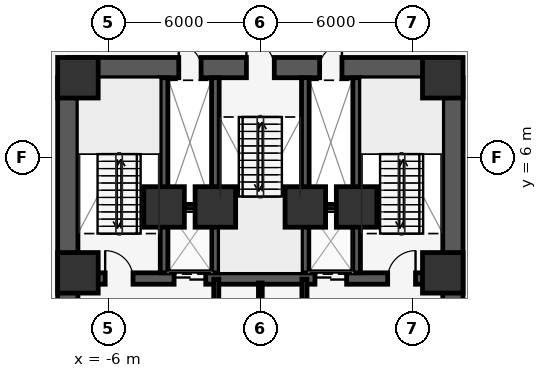
"""IFC4 building model, lengths in metres.
Left out: names, types, materials, properties, quantities, classifications, styles, units other than length and angle.
Written with IfcOpenShell. Run it as: python <this file> out.ifc"""

import sys

from ifc_helpers import new_model, si_unit, direction, frame, frame_2d, origin, origin_2d, place, context, subcontext, project, spatial, rectangle, extrude, element, fill, save


model = new_model("IFC4")
c1 = context("Model", 3, precision=1e-05, world=origin(), true_north=direction((0.0, 1.0)))
c2 = subcontext(c1, "Body", "Model", "MODEL_VIEW")
j1 = project(units=[si_unit("LENGTHUNIT", "METRE"), si_unit("PLANEANGLEUNIT", "RADIAN")], contexts=[c1])
p1 = place(None, origin())
s1 = spatial("IfcSite", under=j1, at=p1, CompositionType="ELEMENT")
p2 = place(p1, origin())
s2 = spatial("IfcBuilding", under=s1, at=p2, CompositionType="ELEMENT")
p3 = place(p2, frame((0.0, 0.0, 34.4)))
s3 = spatial("IfcBuildingStorey", under=s2, at=p3, CompositionType="ELEMENT", Elevation=34.4)
p4 = place(p3, frame((-7.6, 9.55, 0.0), z_axis=(0.0, 0.0, 1.0), x_axis=(1.0, 0.0, 0.0)))
e1 = element("IfcWall", 1, at=p4, inside=s3, PredefinedType="SHEAR", context=c2, shape_type="SweptSolid", body=[
    extrude(rectangle(XDim=15.2, YDim=0.8, at=frame_2d((7.6, 0.0))), origin(), (0.0, 0.0, 1.0), 3.75),
])
p5 = place(p4, frame((7.05, 0.0, 0.0)))
e2 = element("IfcOpeningElement", 2, at=p5, cuts=e1, PredefinedType="OPENING", context=c2, shape_type="SweptSolid", body=[
    extrude(rectangle(XDim=1.1, YDim=2.15, at=frame_2d((0.55, 1.075))), frame((0.0, 0.41, 0.0), z_axis=(0.0, -1.0, 0.0), x_axis=(1.0, 0.0, 0.0)), (0.0, 0.0, 1.0), 0.82),
])
p6 = place(p4, frame((4.38, 0.0, 0.0)))
e3 = element("IfcOpeningElement", 3, at=p6, cuts=e1, PredefinedType="OPENING", context=c2, shape_type="SweptSolid", body=[
    extrude(rectangle(XDim=0.88, YDim=2.15, at=frame_2d((0.44, 1.075))), frame((0.0, 0.41, 0.0), z_axis=(0.0, -1.0, 0.0), x_axis=(1.0, 0.0, 0.0)), (0.0, 0.0, 1.0), 0.82),
])
p7 = place(p4, frame((9.94, 0.0, 0.0)))
e4 = element("IfcOpeningElement", 4, at=p7, cuts=e1, PredefinedType="OPENING", context=c2, shape_type="SweptSolid", body=[
    extrude(rectangle(XDim=0.88, YDim=2.15, at=frame_2d((0.44, 1.075))), frame((0.0, 0.41, 0.0), z_axis=(0.0, -1.0, 0.0), x_axis=(1.0, 0.0, 0.0)), (0.0, 0.0, 1.0), 0.82),
])
p8 = place(p3, frame((-7.2, 1.225, 0.0), z_axis=(0.0, 0.0, 1.0), x_axis=(1.0, 0.0, 0.0)))
e5 = element("IfcWall", 5, at=p8, inside=s3, PredefinedType="SHEAR", context=c2, shape_type="SweptSolid", body=[
    extrude(rectangle(XDim=14.4, YDim=0.45, at=frame_2d((7.2, 0.0))), origin(), (0.0, 0.0, 1.0), 3.75),
])
p9 = place(p8, frame((3.795, 0.0, 0.0)))
e6 = element("IfcOpeningElement", 6, at=p9, cuts=e5, PredefinedType="OPENING", context=c2, shape_type="SweptSolid", body=[
    extrude(rectangle(XDim=1.25, YDim=2.25, at=frame_2d((0.625, 1.125))), frame((0.0, 0.235, 0.0), z_axis=(0.0, -1.0, 0.0), x_axis=(1.0, 0.0, 0.0)), (0.0, 0.0, 1.0), 0.47),
])
p10 = place(p8, frame((9.355, 0.0, 0.0)))
e7 = element("IfcOpeningElement", 7, at=p10, cuts=e5, PredefinedType="OPENING", context=c2, shape_type="SweptSolid", body=[
    extrude(rectangle(XDim=1.25, YDim=2.25, at=frame_2d((0.625, 1.125))), frame((0.0, 0.235, 0.0), z_axis=(0.0, -1.0, 0.0), x_axis=(1.0, 0.0, 0.0)), (0.0, 0.0, 1.0), 0.47),
])
p11 = place(p8, frame((1.075, 0.0, 0.0)))
e8 = element("IfcOpeningElement", 8, at=p11, cuts=e5, PredefinedType="OPENING", context=c2, shape_type="SweptSolid", body=[
    extrude(rectangle(XDim=1.1, YDim=2.15, at=frame_2d((0.55, 1.075))), frame((0.0, 0.235, 0.0), z_axis=(0.0, -1.0, 0.0), x_axis=(1.0, 0.0, 0.0)), (0.0, 0.0, 1.0), 0.47),
])
p12 = place(p8, frame((12.225, 0.0, 0.0)))
e9 = element("IfcOpeningElement", 9, at=p12, cuts=e5, PredefinedType="OPENING", context=c2, shape_type="SweptSolid", body=[
    extrude(rectangle(XDim=1.1, YDim=2.15, at=frame_2d((0.55, 1.075))), frame((0.0, 0.235, 0.0), z_axis=(0.0, -1.0, 0.0), x_axis=(1.0, 0.0, 0.0)), (0.0, 0.0, 1.0), 0.47),
])
for number, where, z_axis, x_axis in (
    (10, (-3.8, 1.45, 0.0), (0.0, 0.0, 1.0), (0.0, 1.0, 0.0)),
    (11, (-1.775, 1.45, 0.0), (0.0, 0.0, 1.0), (0.0, 1.0, 0.0)),
    (12, (1.775, 1.45, 0.0), (0.0, 0.0, 1.0), (0.0, 1.0, 0.0)),
    (13, (3.8, 1.45, 0.0), (0.0, 0.0, 1.0), (0.0, 1.0, 0.0)),
):
    element("IfcWall", number, at=place(p3, frame(where, z_axis=z_axis, x_axis=x_axis)), inside=s3, PredefinedType="SHEAR", context=c2, shape_type="SweptSolid", body=[
        extrude(rectangle(XDim=7.7, YDim=0.3, at=frame_2d((3.85, 0.0))), origin(), (0.0, 0.0, 1.0), 3.75),
    ])
for number, where, z_axis, x_axis in (
    (14, (-7.6, 0.1, 0.0), (0.0, 0.0, 1.0), (0.0, 1.0, 0.0)),
    (15, (7.6, 0.1, 0.0), (0.0, 0.0, 1.0), (0.0, 1.0, 0.0)),
):
    element("IfcWall", number, at=place(p3, frame(where, z_axis=z_axis, x_axis=x_axis)), inside=s3, PredefinedType="SHEAR", context=c2, shape_type="SweptSolid", body=[
        extrude(rectangle(XDim=9.05, YDim=0.8, at=frame_2d((4.525, 0.0))), origin(), (0.0, 0.0, 1.0), 3.75),
    ])
for number, where, z_axis, x_axis in (
    (16, (7.2, 1.45, 0.0), (0.0, 0.0, 1.0), (1.0, 0.0, 0.0)),
    (17, (7.2, 9.15, 0.0), (0.0, 0.0, 1.0), (1.0, 0.0, 0.0)),
    (18, (-7.2, 9.15, 0.0), (0.0, 0.0, 1.0), (1.0, 0.0, 0.0)),
    (19, (-7.2, 1.45, 0.0), (0.0, 0.0, 1.0), (1.0, 0.0, 0.0)),
    (20, (-3.8, 4.05, 0.0), (0.0, 0.0, 1.0), (1.0, 0.0, 0.0)),
    (21, (3.8, 4.05, 0.0), (0.0, 0.0, 1.0), (1.0, 0.0, 0.0)),
    (22, (-1.775, 4.05, 0.0), (0.0, 0.0, 1.0), (1.0, 0.0, 0.0)),
    (23, (1.775, 4.05, 0.0), (0.0, 0.0, 1.0), (1.0, 0.0, 0.0)),
):
    element("IfcColumn", number, at=place(p3, frame(where, z_axis=z_axis, x_axis=x_axis)), inside=s3, PredefinedType="COLUMN", context=c2, shape_type="SweptSolid", body=[
        extrude(rectangle(XDim=1.6, YDim=1.6, at=origin_2d()), origin(), (0.0, 0.0, 1.0), 4.0),
    ])
p13 = place(p3, frame((4.923, 41.122, 0.0), z_axis=(0.0, 0.0, 1.0), x_axis=(0.504213113214, -0.863579258935, 0.0)))
e24 = element("IfcWall", 24, at=p13, inside=s3, PredefinedType="STANDARD", context=c2, shape_type="SweptSolid", body=[
    extrude(rectangle(XDim=67.041, YDim=0.32, at=frame_2d((33.521, 0.0))), origin(), (0.0, 0.0, 1.0), 3.75),
])
p14 = place(p13, frame((33.021, 0.0, 0.0)))
e25 = element("IfcOpeningElement", 25, at=p14, cuts=e24, PredefinedType="OPENING", context=c2, shape_type="SweptSolid", body=[
    extrude(rectangle(XDim=1.0, YDim=2.15, at=frame_2d((0.5, 1.075))), frame((0.0, 0.17, 0.0), z_axis=(0.0, -1.0, 0.0), x_axis=(1.0, 0.0, 0.0)), (0.0, 0.0, 1.0), 0.34),
])
p15 = place(p3, frame((-38.726, -16.773, 0.0), z_axis=(0.0, 0.0, 1.0), x_axis=(0.504213113214, 0.863579258935, 0.0)))
e26 = element("IfcWall", 26, at=p15, inside=s3, PredefinedType="STANDARD", context=c2, shape_type="SweptSolid", body=[
    extrude(rectangle(XDim=67.041, YDim=0.32, at=frame_2d((33.521, 0.0))), origin(), (0.0, 0.0, 1.0), 3.75),
])
p16 = place(p15, frame((33.021, 0.0, 0.0)))
e27 = element("IfcOpeningElement", 27, at=p16, cuts=e26, PredefinedType="OPENING", context=c2, shape_type="SweptSolid", body=[
    extrude(rectangle(XDim=1.0, YDim=2.15, at=frame_2d((0.5, 1.075))), frame((0.0, 0.17, 0.0), z_axis=(0.0, -1.0, 0.0), x_axis=(1.0, 0.0, 0.0)), (0.0, 0.0, 1.0), 0.34),
])
for number, where, z_axis, x_axis in (
    (28, (-3.65, 4.05, 0.0), (0.0, 0.0, 1.0), (1.0, 0.0, 0.0)),
    (29, (1.92, 4.05, 0.0), (0.0, 0.0, 1.0), (1.0, 0.0, 0.0)),
):
    element("IfcWall", number, at=place(p3, frame(where, z_axis=z_axis, x_axis=x_axis)), inside=s3, PredefinedType="PARTITIONING", context=c2, shape_type="SweptSolid", body=[
        extrude(rectangle(XDim=1.73, YDim=0.2, at=frame_2d((0.865, 0.0))), origin(), (0.0, 0.0, 1.0), 3.75),
    ])
p17 = place(p3, frame((-1.74, -1.78, 0.0), z_axis=(0.0, 0.0, 1.0), x_axis=(0.0, 1.0, 0.0)))
e30 = element("IfcWall", 30, at=p17, inside=s3, PredefinedType="PARTITIONING", context=c2, shape_type="SweptSolid", body=[
    extrude(rectangle(XDim=2.98, YDim=0.2, at=frame_2d((1.49, 0.0))), origin(), (0.0, 0.0, 1.0), 3.75),
])
p18 = place(p17, frame((0.89, 0.0, 0.0)))
e31 = element("IfcOpeningElement", 31, at=p18, cuts=e30, PredefinedType="OPENING", context=c2, shape_type="SweptSolid", body=[
    extrude(rectangle(XDim=0.88, YDim=2.15, at=frame_2d((0.44, 1.075))), frame((0.0, 0.11, 0.0), z_axis=(0.0, -1.0, 0.0), x_axis=(1.0, 0.0, 0.0)), (0.0, 0.0, 1.0), 0.22),
])
p19 = place(p3, frame((1.74, -1.78, 0.0), z_axis=(0.0, 0.0, 1.0), x_axis=(0.0, 1.0, 0.0)))
e32 = element("IfcWall", 32, at=p19, inside=s3, PredefinedType="PARTITIONING", context=c2, shape_type="SweptSolid", body=[
    extrude(rectangle(XDim=2.98, YDim=0.2, at=frame_2d((1.49, 0.0))), origin(), (0.0, 0.0, 1.0), 3.75),
])
p20 = place(p19, frame((0.89, 0.0, 0.0)))
e33 = element("IfcOpeningElement", 33, at=p20, cuts=e32, PredefinedType="OPENING", context=c2, shape_type="SweptSolid", body=[
    extrude(rectangle(XDim=0.88, YDim=2.15, at=frame_2d((0.44, 1.075))), frame((0.0, 0.11, 0.0), z_axis=(0.0, -1.0, 0.0), x_axis=(1.0, 0.0, 0.0)), (0.0, 0.0, 1.0), 0.22),
])
p21 = place(p3, frame((0.0, -1.78, 0.0), z_axis=(0.0, 0.0, 1.0), x_axis=(0.0, 1.0, 0.0)))
e34 = element("IfcWall", 34, at=p21, inside=s3, PredefinedType="PARTITIONING", context=c2, shape_type="SweptSolid", body=[
    extrude(rectangle(XDim=2.83, YDim=0.15, at=frame_2d((1.415, 0.0))), origin(), (0.0, 0.0, 1.0), 3.75),
])
p22 = place(p9, origin())
e35 = element("IfcDoor", 35, at=p22, inside=s3, OperationType="DOUBLE_DOOR_SLIDING", PredefinedType="DOOR", context=c2, shape_type="SweptSolid", body=[
    extrude(rectangle(XDim=1.25, YDim=2.25, at=frame_2d((0.625, 1.125))), frame((0.0, 0.025, 0.0), z_axis=(0.0, -1.0, 0.0), x_axis=(1.0, 0.0, 0.0)), (0.0, 0.0, 1.0), 0.05),
])
fill(e6, e35)
p23 = place(p10, origin())
e36 = element("IfcDoor", 36, at=p23, inside=s3, OperationType="DOUBLE_DOOR_SLIDING", PredefinedType="DOOR", context=c2, shape_type="SweptSolid", body=[
    extrude(rectangle(XDim=1.25, YDim=2.25, at=frame_2d((0.625, 1.125))), frame((0.0, 0.025, 0.0), z_axis=(0.0, -1.0, 0.0), x_axis=(1.0, 0.0, 0.0)), (0.0, 0.0, 1.0), 0.05),
])
fill(e7, e36)
p24 = place(p11, origin())
e37 = element("IfcDoor", 37, at=p24, inside=s3, OperationType="SINGLE_SWING_LEFT", PredefinedType="DOOR", context=c2, shape_type="SweptSolid", body=[
    extrude(rectangle(XDim=1.1, YDim=2.15, at=frame_2d((0.55, 1.075))), frame((0.0, 0.025, 0.0), z_axis=(0.0, -1.0, 0.0), x_axis=(1.0, 0.0, 0.0)), (0.0, 0.0, 1.0), 0.05),
])
fill(e8, e37)
p25 = place(p12, origin())
e38 = element("IfcDoor", 38, at=p25, inside=s3, OperationType="SINGLE_SWING_RIGHT", PredefinedType="DOOR", context=c2, shape_type="SweptSolid", body=[
    extrude(rectangle(XDim=1.1, YDim=2.15, at=frame_2d((0.55, 1.075))), frame((0.0, 0.025, 0.0), z_axis=(0.0, -1.0, 0.0), x_axis=(1.0, 0.0, 0.0)), (0.0, 0.0, 1.0), 0.05),
])
fill(e9, e38)
p26 = place(p5, origin())
e39 = element("IfcDoor", 39, at=p26, inside=s3, OperationType="SINGLE_SWING_LEFT", PredefinedType="DOOR", context=c2, shape_type="SweptSolid", body=[
    extrude(rectangle(XDim=1.1, YDim=2.15, at=frame_2d((0.55, 1.075))), frame((0.0, 0.025, 0.0), z_axis=(0.0, -1.0, 0.0), x_axis=(1.0, 0.0, 0.0)), (0.0, 0.0, 1.0), 0.05),
])
fill(e2, e39)
p27 = place(p6, origin())
e40 = element("IfcDoor", 40, at=p27, inside=s3, OperationType="SINGLE_SWING_LEFT", PredefinedType="DOOR", context=c2, shape_type="SweptSolid", body=[
    extrude(rectangle(XDim=0.88, YDim=2.15, at=frame_2d((0.44, 1.075))), frame((0.0, 0.025, 0.0), z_axis=(0.0, -1.0, 0.0), x_axis=(1.0, 0.0, 0.0)), (0.0, 0.0, 1.0), 0.05),
])
fill(e3, e40)
p28 = place(p7, origin())
e41 = element("IfcDoor", 41, at=p28, inside=s3, OperationType="SINGLE_SWING_RIGHT", PredefinedType="DOOR", context=c2, shape_type="SweptSolid", body=[
    extrude(rectangle(XDim=0.88, YDim=2.15, at=frame_2d((0.44, 1.075))), frame((0.0, 0.025, 0.0), z_axis=(0.0, -1.0, 0.0), x_axis=(1.0, 0.0, 0.0)), (0.0, 0.0, 1.0), 0.05),
])
fill(e4, e41)
save(model, sys.argv[1])
